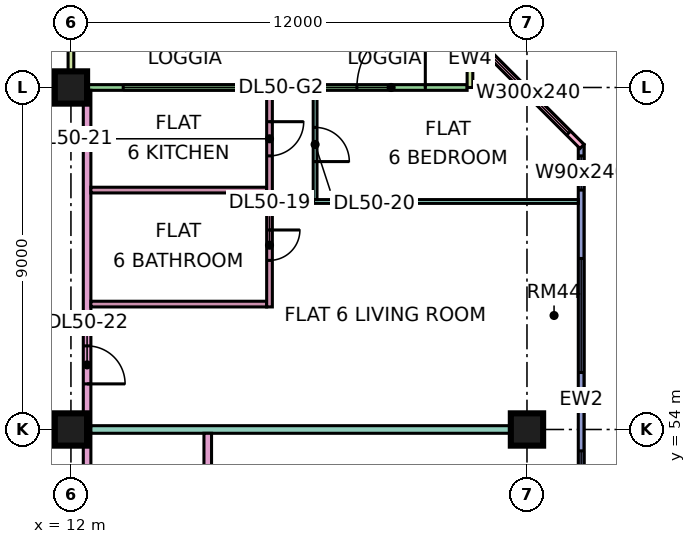
"""IFC4 building model, lengths in metres.
Left out: names, types, materials, properties, quantities, classifications, styles, units other than length and angle.
Written with IfcOpenShell. Run it as: python <this file> out.ifc"""

import sys

from ifc_helpers import new_model, si_unit, direction, frame, frame_2d, origin, origin_2d, place, context, subcontext, project, spatial, rectangle, extrude, element, fill, save


model = new_model("IFC4")
c1 = context("Model", 3, precision=1e-05, world=origin(), true_north=direction((0.0, 1.0)))
c2 = subcontext(c1, "Body", "Model", "MODEL_VIEW")
j1 = project(units=[si_unit("LENGTHUNIT", "METRE"), si_unit("PLANEANGLEUNIT", "RADIAN")], contexts=[c1])
p1 = place(None, origin())
s1 = spatial("IfcSite", under=j1, at=p1, CompositionType="ELEMENT")
p2 = place(p1, origin())
s2 = spatial("IfcBuilding", under=s1, at=p2, CompositionType="ELEMENT")
p3 = place(p2, frame((0.0, 0.0, 215.4)))
s3 = spatial("IfcBuildingStorey", under=s2, at=p3, CompositionType="ELEMENT", Elevation=215.4)
for number, where, z_axis, x_axis in (
    (1, (12.0, 54.0, 0.0), (0.0, 0.0, 1.0), (1.0, 0.0, 0.0)),
    (2, (12.0, 63.0, 0.0), (0.0, 0.0, 1.0), (1.0, 0.0, 0.0)),
    (3, (24.0, 54.0, 0.0), (0.0, 0.0, 1.0), (1.0, 0.0, 0.0)),
):
    element("IfcColumn", number, at=place(p3, frame(where, z_axis=z_axis, x_axis=x_axis)), inside=s3, PredefinedType="COLUMN", context=c2, shape_type="SweptSolid", body=[
        extrude(rectangle(XDim=0.85, YDim=0.85, at=origin_2d()), origin(), (0.0, 0.0, 1.0), 3.75),
    ])
p4 = place(p3, frame((25.425, 48.075, 0.0), z_axis=(0.0, 0.0, 1.0), x_axis=(0.0, 1.0, 0.0)))
e4 = element("IfcWall", 4, at=p4, inside=s3, PredefinedType="SOLIDWALL", context=c2, shape_type="SweptSolid", body=[
    extrude(rectangle(XDim=13.425, YDim=0.15, at=frame_2d((6.712, 0.0))), origin(), (0.0, 0.0, 1.0), 3.35),
])
p5 = place(p4, frame((0.562, 0.0, 0.45)))
e5 = element("IfcOpeningElement", 5, at=p5, cuts=e4, PredefinedType="OPENING", context=c2, shape_type="SweptSolid", body=[
    extrude(rectangle(XDim=4.8, YDim=2.4, at=frame_2d((2.4, 1.2))), frame((0.0, 0.085, 0.0), z_axis=(0.0, -1.0, 0.0), x_axis=(1.0, 0.0, 0.0)), (0.0, 0.0, 1.0), 0.17),
])
p6 = place(p4, frame((7.425, 0.0, 0.45)))
e6 = element("IfcOpeningElement", 6, at=p6, cuts=e4, PredefinedType="OPENING", context=c2, shape_type="SweptSolid", body=[
    extrude(rectangle(XDim=3.0, YDim=2.4, at=frame_2d((1.5, 1.2))), frame((0.0, 0.085, 0.0), z_axis=(0.0, -1.0, 0.0), x_axis=(1.0, 0.0, 0.0)), (0.0, 0.0, 1.0), 0.17),
])
p7 = place(p4, frame((12.225, 0.0, 0.45)))
e7 = element("IfcOpeningElement", 7, at=p7, cuts=e4, PredefinedType="OPENING", context=c2, shape_type="SweptSolid", body=[
    extrude(rectangle(XDim=0.9, YDim=2.4, at=frame_2d((0.45, 1.2))), frame((0.0, 0.085, 0.0), z_axis=(0.0, -1.0, 0.0), x_axis=(1.0, 0.0, 0.0)), (0.0, 0.0, 1.0), 0.17),
])
p8 = place(p3, frame((25.447, 61.447, 0.0), z_axis=(0.0, 0.0, 1.0), x_axis=(-0.707106781187, 0.707106781187, 0.0)))
e8 = element("IfcWall", 8, at=p8, inside=s3, PredefinedType="SOLIDWALL", context=c2, shape_type="SweptSolid", body=[
    extrude(rectangle(XDim=4.243, YDim=0.15, at=frame_2d((2.121, 0.0))), origin(), (0.0, 0.0, 1.0), 3.35),
])
p9 = place(p8, frame((0.498, 0.0, 0.45)))
e9 = element("IfcOpeningElement", 9, at=p9, cuts=e8, PredefinedType="OPENING", context=c2, shape_type="SweptSolid", body=[
    extrude(rectangle(XDim=3.0, YDim=2.4, at=frame_2d((1.5, 1.2))), frame((0.0, 0.085, 0.0), z_axis=(0.0, -1.0, 0.0), x_axis=(1.0, 0.0, 0.0)), (0.0, 0.0, 1.0), 0.17),
])
p10 = place(p3, frame((22.425, 63.0, 0.0), z_axis=(0.0, 0.0, 1.0), x_axis=(-1.0, 0.0, 0.0)))
e10 = element("IfcWall", 10, at=p10, inside=s3, PredefinedType="SOLIDWALL", context=c2, shape_type="SweptSolid", body=[
    extrude(rectangle(XDim=10.35, YDim=0.15, at=frame_2d((5.175, 0.0))), origin(), (0.0, 0.0, 1.0), 3.35),
])
p11 = place(p10, frame((1.1, 0.0, 0.0)))
e11 = element("IfcOpeningElement", 11, at=p11, cuts=e10, PredefinedType="OPENING", context=c2, shape_type="SweptSolid", body=[
    extrude(rectangle(XDim=1.8, YDim=2.4, at=frame_2d((0.9, 1.2))), frame((0.0, 0.085, 0.0), z_axis=(0.0, -1.0, 0.0), x_axis=(1.0, 0.0, 0.0)), (0.0, 0.0, 1.0), 0.17),
])
p12 = place(p10, frame((6.05, 0.0, 0.45)))
e12 = element("IfcOpeningElement", 12, at=p12, cuts=e10, PredefinedType="OPENING", context=c2, shape_type="SweptSolid", body=[
    extrude(rectangle(XDim=3.0, YDim=2.4, at=frame_2d((1.5, 1.2))), frame((0.0, 0.085, 0.0), z_axis=(0.0, -1.0, 0.0), x_axis=(1.0, 0.0, 0.0)), (0.0, 0.0, 1.0), 0.17),
])
for number, where, z_axis, x_axis in (
    (13, (22.5, 64.5, 0.0), (0.0, 0.0, 1.0), (0.0, -1.0, 0.0)),
    (14, (12.0, 64.5, 0.0), (0.0, 0.0, 1.0), (0.0, -1.0, 0.0)),
):
    element("IfcWall", number, at=place(p3, frame(where, z_axis=z_axis, x_axis=x_axis)), inside=s3, PredefinedType="SOLIDWALL", context=c2, shape_type="SweptSolid", body=[
        extrude(rectangle(XDim=1.5, YDim=0.15, at=frame_2d((0.75, 0.0))), origin(), (0.0, 0.0, 1.0), 3.35),
    ])
p13 = place(p3, frame((12.425, 20.0, 0.0), z_axis=(0.0, 0.0, 1.0), x_axis=(0.0, 1.0, 0.0)))
e15 = element("IfcWall", 15, at=p13, inside=s3, PredefinedType="PARTITIONING", context=c2, shape_type="SweptSolid", body=[
    extrude(rectangle(XDim=42.926, YDim=0.2, at=frame_2d((21.463, 0.0))), origin(), (0.0, 0.0, 1.0), 3.35),
])
p14 = place(p13, frame((7.0, 0.0, 0.0)))
e16 = element("IfcOpeningElement", 16, at=p14, cuts=e15, PredefinedType="OPENING", context=c2, shape_type="SweptSolid", body=[
    extrude(rectangle(XDim=1.0, YDim=2.1, at=frame_2d((0.5, 1.05))), frame((0.0, 0.11, 0.0), z_axis=(0.0, -1.0, 0.0), x_axis=(1.0, 0.0, 0.0)), (0.0, 0.0, 1.0), 0.22),
])
p15 = place(p13, frame((12.95, 0.0, 0.0)))
e17 = element("IfcOpeningElement", 17, at=p15, cuts=e15, PredefinedType="OPENING", context=c2, shape_type="SweptSolid", body=[
    extrude(rectangle(XDim=1.0, YDim=2.1, at=frame_2d((0.5, 1.05))), frame((0.0, 0.11, 0.0), z_axis=(0.0, -1.0, 0.0), x_axis=(1.0, 0.0, 0.0)), (0.0, 0.0, 1.0), 0.22),
])
p16 = place(p13, frame((23.35, 0.0, 0.0)))
e18 = element("IfcOpeningElement", 18, at=p16, cuts=e15, PredefinedType="OPENING", context=c2, shape_type="SweptSolid", body=[
    extrude(rectangle(XDim=1.0, YDim=2.1, at=frame_2d((0.5, 1.05))), frame((0.0, 0.11, 0.0), z_axis=(0.0, -1.0, 0.0), x_axis=(1.0, 0.0, 0.0)), (0.0, 0.0, 1.0), 0.22),
])
p17 = place(p13, frame((35.2, 0.0, 0.0)))
e19 = element("IfcOpeningElement", 19, at=p17, cuts=e15, PredefinedType="OPENING", context=c2, shape_type="SweptSolid", body=[
    extrude(rectangle(XDim=1.0, YDim=2.1, at=frame_2d((0.5, 1.05))), frame((0.0, 0.11, 0.0), z_axis=(0.0, -1.0, 0.0), x_axis=(1.0, 0.0, 0.0)), (0.0, 0.0, 1.0), 0.22),
])
p18 = place(p13, frame((1.15, 0.0, 0.0)))
e20 = element("IfcOpeningElement", 20, at=p18, cuts=e15, PredefinedType="OPENING", context=c2, shape_type="SweptSolid", body=[
    extrude(rectangle(XDim=1.8, YDim=2.1, at=frame_2d((0.9, 1.05))), frame((0.0, 0.11, 0.0), z_axis=(0.0, -1.0, 0.0), x_axis=(1.0, 0.0, 0.0)), (0.0, 0.0, 1.0), 0.22),
])
p19 = place(p13, frame((28.6, 0.0, 0.0)))
e21 = element("IfcOpeningElement", 21, at=p19, cuts=e15, PredefinedType="OPENING", context=c2, shape_type="SweptSolid", body=[
    extrude(rectangle(XDim=1.8, YDim=2.1, at=frame_2d((0.9, 1.05))), frame((0.0, 0.11, 0.0), z_axis=(0.0, -1.0, 0.0), x_axis=(1.0, 0.0, 0.0)), (0.0, 0.0, 1.0), 0.22),
])
p20 = place(p3, frame((12.525, 54.0, 0.0), z_axis=(0.0, 0.0, 1.0), x_axis=(1.0, 0.0, 0.0)))
e22 = element("IfcWall", 22, at=p20, inside=s3, PredefinedType="PARTITIONING", context=c2, shape_type="SweptSolid", body=[
    extrude(rectangle(XDim=11.475, YDim=0.2, at=frame_2d((5.738, 0.0))), origin(), (0.0, 0.0, 1.0), 3.35),
])
for number, where, z_axis, x_axis in (
    (23, (12.525, 57.3, 0.0), (0.0, 0.0, 1.0), (1.0, 0.0, 0.0)),
    (24, (12.525, 60.3, 0.0), (0.0, 0.0, 1.0), (1.0, 0.0, 0.0)),
):
    element("IfcWall", number, at=place(p3, frame(where, z_axis=z_axis, x_axis=x_axis)), inside=s3, PredefinedType="PARTITIONING", context=c2, shape_type="SweptSolid", body=[
        extrude(rectangle(XDim=4.625, YDim=0.15, at=frame_2d((2.312, 0.0))), origin(), (0.0, 0.0, 1.0), 3.35),
    ])
p21 = place(p3, frame((15.6, 51.225, 0.0), z_axis=(0.0, 0.0, 1.0), x_axis=(0.0, 1.0, 0.0)))
e25 = element("IfcWall", 25, at=p21, inside=s3, PredefinedType="PARTITIONING", context=c2, shape_type="SweptSolid", body=[
    extrude(rectangle(XDim=2.675, YDim=0.2, at=frame_2d((1.337, 0.0))), origin(), (0.0, 0.0, 1.0), 3.35),
])
p22 = place(p3, frame((17.225, 57.225, 0.0), z_axis=(0.0, 0.0, 1.0), x_axis=(0.0, 1.0, 0.0)))
e26 = element("IfcWall", 26, at=p22, inside=s3, PredefinedType="PARTITIONING", context=c2, shape_type="SweptSolid", body=[
    extrude(rectangle(XDim=5.701, YDim=0.15, at=frame_2d((2.851, 0.0))), origin(), (0.0, 0.0, 1.0), 3.35),
])
p23 = place(p22, frame((1.225, 0.0, 0.0)))
e27 = element("IfcOpeningElement", 27, at=p23, cuts=e26, PredefinedType="OPENING", context=c2, shape_type="SweptSolid", body=[
    extrude(rectangle(XDim=0.8, YDim=2.1, at=frame_2d((0.4, 1.05))), frame((0.0, 0.085, 0.0), z_axis=(0.0, -1.0, 0.0), x_axis=(1.0, 0.0, 0.0)), (0.0, 0.0, 1.0), 0.17),
])
p24 = place(p22, frame((3.975, 0.0, 0.0)))
e28 = element("IfcOpeningElement", 28, at=p24, cuts=e26, PredefinedType="OPENING", context=c2, shape_type="SweptSolid", body=[
    extrude(rectangle(XDim=0.9, YDim=2.1, at=frame_2d((0.45, 1.05))), frame((0.0, 0.085, 0.0), z_axis=(0.0, -1.0, 0.0), x_axis=(1.0, 0.0, 0.0)), (0.0, 0.0, 1.0), 0.17),
])
p25 = place(p3, frame((18.375, 60.0, 0.0), z_axis=(0.0, 0.0, 1.0), x_axis=(1.0, 0.0, 0.0)))
e29 = element("IfcWall", 29, at=p25, inside=s3, PredefinedType="PARTITIONING", context=c2, shape_type="SweptSolid", body=[
    extrude(rectangle(XDim=6.975, YDim=0.1, at=frame_2d((3.488, 0.0))), origin(), (0.0, 0.0, 1.0), 3.35),
])
p26 = place(p3, frame((18.425, 60.05, 0.0), z_axis=(0.0, 0.0, 1.0), x_axis=(0.0, 1.0, 0.0)))
e30 = element("IfcWall", 30, at=p26, inside=s3, PredefinedType="PARTITIONING", context=c2, shape_type="SweptSolid", body=[
    extrude(rectangle(XDim=2.876, YDim=0.1, at=frame_2d((1.438, 0.0))), origin(), (0.0, 0.0, 1.0), 3.35),
])
p27 = place(p26, frame((1.0, 0.0, 0.0)))
e31 = element("IfcOpeningElement", 31, at=p27, cuts=e30, PredefinedType="OPENING", context=c2, shape_type="SweptSolid", body=[
    extrude(rectangle(XDim=0.9, YDim=2.1, at=frame_2d((0.45, 1.05))), frame((0.0, 0.06, 0.0), z_axis=(0.0, -1.0, 0.0), x_axis=(1.0, 0.0, 0.0)), (0.0, 0.0, 1.0), 0.12),
])
p28 = place(p5, origin())
e32 = element("IfcWindow", 32, at=p28, inside=s3, PartitioningType="SINGLE_PANEL", PredefinedType="WINDOW", context=c2, shape_type="SweptSolid", body=[
    extrude(rectangle(XDim=4.8, YDim=2.4, at=frame_2d((2.4, 1.2))), frame((0.0, 0.03, 0.0), z_axis=(0.0, -1.0, 0.0), x_axis=(1.0, 0.0, 0.0)), (0.0, 0.0, 1.0), 0.06),
])
fill(e5, e32)
p29 = place(p6, origin())
e33 = element("IfcWindow", 33, at=p29, inside=s3, PartitioningType="SINGLE_PANEL", PredefinedType="WINDOW", context=c2, shape_type="SweptSolid", body=[
    extrude(rectangle(XDim=3.0, YDim=2.4, at=frame_2d((1.5, 1.2))), frame((0.0, 0.03, 0.0), z_axis=(0.0, -1.0, 0.0), x_axis=(1.0, 0.0, 0.0)), (0.0, 0.0, 1.0), 0.06),
])
fill(e6, e33)
p30 = place(p7, origin())
e34 = element("IfcWindow", 34, at=p30, inside=s3, PartitioningType="SINGLE_PANEL", PredefinedType="WINDOW", context=c2, shape_type="SweptSolid", body=[
    extrude(rectangle(XDim=0.9, YDim=2.4, at=frame_2d((0.45, 1.2))), frame((0.0, 0.03, 0.0), z_axis=(0.0, -1.0, 0.0), x_axis=(1.0, 0.0, 0.0)), (0.0, 0.0, 1.0), 0.06),
])
fill(e7, e34)
p31 = place(p9, origin())
e35 = element("IfcWindow", 35, at=p31, inside=s3, PartitioningType="SINGLE_PANEL", PredefinedType="WINDOW", context=c2, shape_type="SweptSolid", body=[
    extrude(rectangle(XDim=3.0, YDim=2.4, at=frame_2d((1.5, 1.2))), frame((0.0, 0.03, 0.0), z_axis=(0.0, -1.0, 0.0), x_axis=(1.0, 0.0, 0.0)), (0.0, 0.0, 1.0), 0.06),
])
fill(e9, e35)
p32 = place(p11, frame((1.8, 0.0, 0.0), z_axis=(0.0, 0.0, 1.0), x_axis=(-1.0, 0.0, 0.0)))
e36 = element("IfcDoor", 36, at=p32, inside=s3, OperationType="DOUBLE_DOOR_SINGLE_SWING", PredefinedType="DOOR", context=c2, shape_type="SweptSolid", body=[
    extrude(rectangle(XDim=1.8, YDim=2.4, at=frame_2d((0.9, 1.2))), frame((0.0, 0.025, 0.0), z_axis=(0.0, -1.0, 0.0), x_axis=(1.0, 0.0, 0.0)), (0.0, 0.0, 1.0), 0.05),
])
fill(e11, e36)
p33 = place(p12, origin())
e37 = element("IfcWindow", 37, at=p33, inside=s3, PartitioningType="SINGLE_PANEL", PredefinedType="WINDOW", context=c2, shape_type="SweptSolid", body=[
    extrude(rectangle(XDim=3.0, YDim=2.4, at=frame_2d((1.5, 1.2))), frame((0.0, 0.03, 0.0), z_axis=(0.0, -1.0, 0.0), x_axis=(1.0, 0.0, 0.0)), (0.0, 0.0, 1.0), 0.06),
])
fill(e12, e37)
p34 = place(p23, origin())
e38 = element("IfcDoor", 38, at=p34, inside=s3, OperationType="SINGLE_SWING_RIGHT", PredefinedType="DOOR", context=c2, shape_type="SweptSolid", body=[
    extrude(rectangle(XDim=0.8, YDim=2.1, at=frame_2d((0.4, 1.05))), frame((0.0, 0.025, 0.0), z_axis=(0.0, -1.0, 0.0), x_axis=(1.0, 0.0, 0.0)), (0.0, 0.0, 1.0), 0.05),
])
fill(e27, e38)
p35 = place(p27, frame((0.9, 0.0, 0.0), z_axis=(0.0, 0.0, 1.0), x_axis=(-1.0, 0.0, 0.0)))
e39 = element("IfcDoor", 39, at=p35, inside=s3, OperationType="SINGLE_SWING_LEFT", PredefinedType="DOOR", context=c2, shape_type="SweptSolid", body=[
    extrude(rectangle(XDim=0.9, YDim=2.1, at=frame_2d((0.45, 1.05))), frame((0.0, 0.025, 0.0), z_axis=(0.0, -1.0, 0.0), x_axis=(1.0, 0.0, 0.0)), (0.0, 0.0, 1.0), 0.05),
])
fill(e31, e39)
p36 = place(p24, origin())
e40 = element("IfcDoor", 40, at=p36, inside=s3, OperationType="SINGLE_SWING_RIGHT", PredefinedType="DOOR", context=c2, shape_type="SweptSolid", body=[
    extrude(rectangle(XDim=0.9, YDim=2.1, at=frame_2d((0.45, 1.05))), frame((0.0, 0.025, 0.0), z_axis=(0.0, -1.0, 0.0), x_axis=(1.0, 0.0, 0.0)), (0.0, 0.0, 1.0), 0.05),
])
fill(e28, e40)
p37 = place(p17, frame((1.0, 0.0, 0.0), z_axis=(0.0, 0.0, 1.0), x_axis=(-1.0, 0.0, 0.0)))
e41 = element("IfcDoor", 41, at=p37, inside=s3, OperationType="SINGLE_SWING_LEFT", PredefinedType="DOOR", context=c2, shape_type="SweptSolid", body=[
    extrude(rectangle(XDim=1.0, YDim=2.1, at=frame_2d((0.5, 1.05))), frame((0.0, 0.025, 0.0), z_axis=(0.0, -1.0, 0.0), x_axis=(1.0, 0.0, 0.0)), (0.0, 0.0, 1.0), 0.05),
])
fill(e19, e41)
save(model, sys.argv[1])
